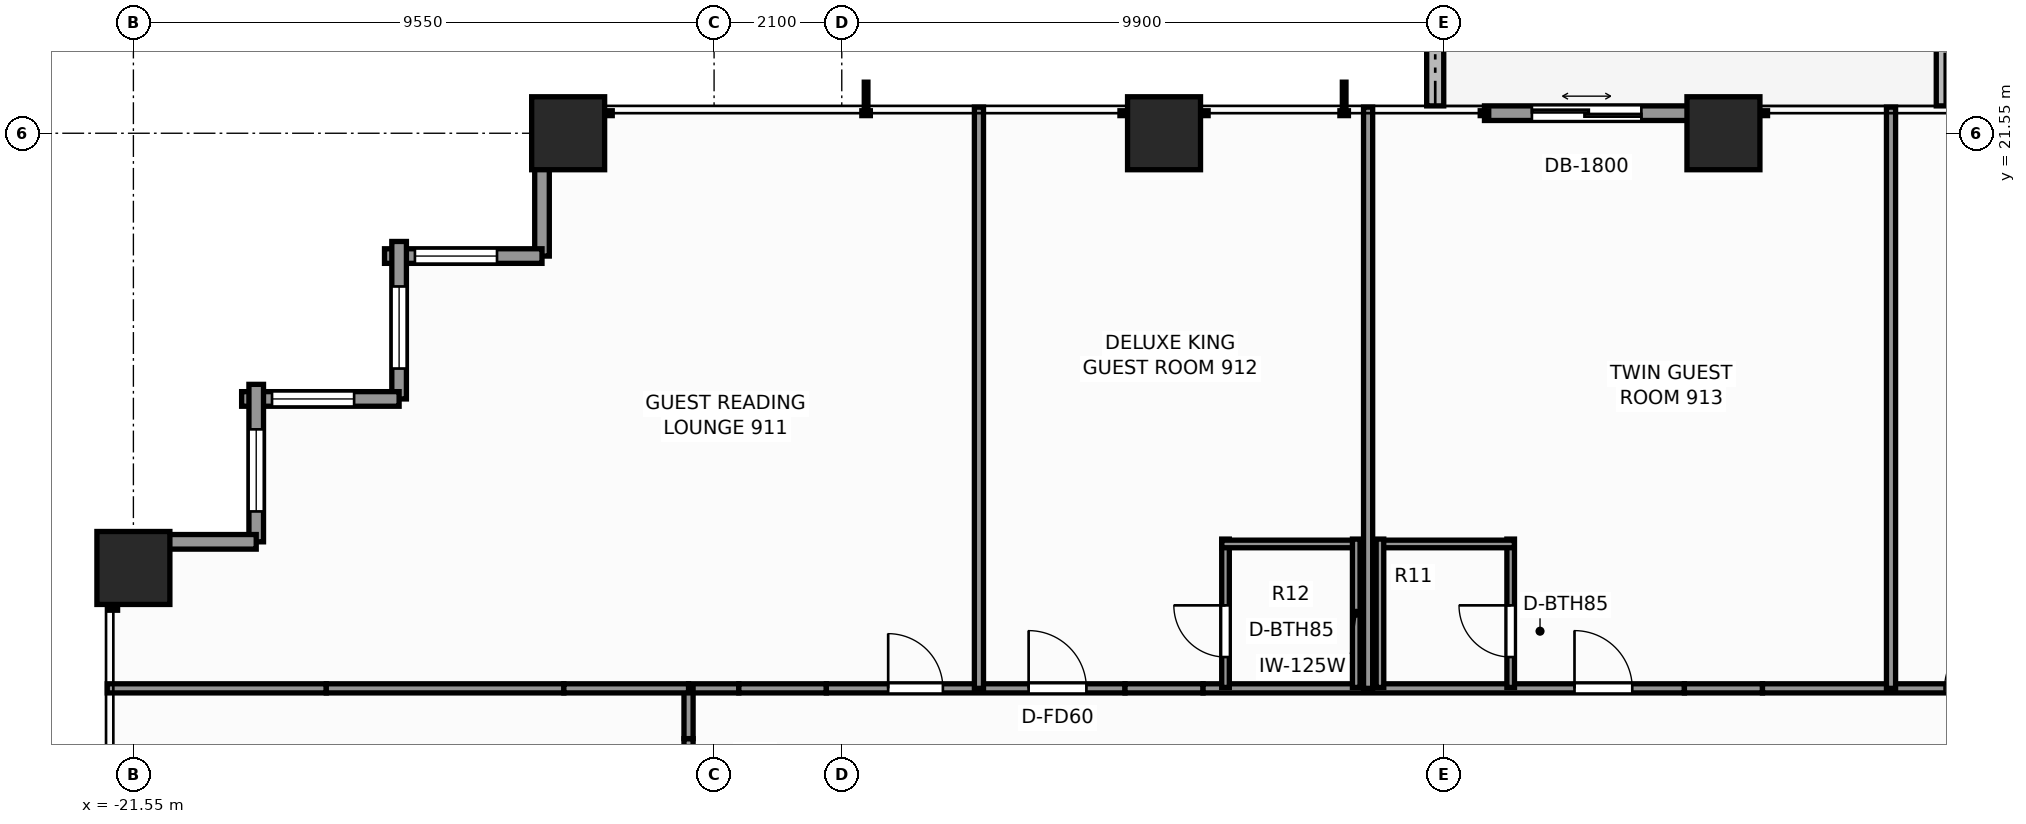
"""IFC4 building model, lengths in metres.
Left out: names, types, materials, properties, quantities, classifications, styles, units other than length and angle.
Written with IfcOpenShell. Run it as: python <this file> out.ifc"""

import sys

from ifc_helpers import new_model, si_unit, direction, frame, frame_2d, origin, origin_2d, place, context, subcontext, project, spatial, rectangle, extrude, element, fill, save


model = new_model("IFC4")
c1 = context("Model", 3, precision=1e-05, world=origin(), true_north=direction((0.0, 1.0)))
c2 = subcontext(c1, "Body", "Model", "MODEL_VIEW")
j1 = project(units=[si_unit("LENGTHUNIT", "METRE"), si_unit("PLANEANGLEUNIT", "RADIAN")], contexts=[c1])
p1 = place(None, origin())
s1 = spatial("IfcSite", under=j1, at=p1, CompositionType="ELEMENT")
p2 = place(p1, origin())
s2 = spatial("IfcBuilding", under=s1, at=p2, CompositionType="ELEMENT")
p3 = place(p2, frame((0.0, 0.0, 33.7)))
s3 = spatial("IfcBuildingStorey", under=s2, at=p3, CompositionType="ELEMENT", Elevation=33.7)
for number, where, z_axis, x_axis in (
    (1, (-14.4, 21.55, 0.0), (0.0, 0.0, 1.0), (1.0, 0.0, 0.0)),
    (2, (-4.6, 21.55, 0.0), (0.0, 0.0, 1.0), (1.0, 0.0, 0.0)),
    (3, (4.6, 21.55, 0.0), (0.0, 0.0, 1.0), (1.0, 0.0, 0.0)),
    (4, (-21.55, 14.4, 0.0), (0.0, 0.0, 1.0), (1.0, 0.0, 0.0)),
):
    element("IfcColumn", number, at=place(p3, frame(where, z_axis=z_axis, x_axis=x_axis)), inside=s3, PredefinedType="COLUMN", context=c2, shape_type="SweptSolid", body=[
        extrude(rectangle(XDim=1.2, YDim=1.2, at=origin_2d()), origin(), (0.0, 0.0, 1.0), 3.3),
    ])
for number, where, z_axis, x_axis in (
    (5, (8.24, 22.0, -0.06), (0.0, 0.0, 1.0), (0.0, 1.0, 0.0)),
    (6, (-0.14, 25.3, -0.06), (0.0, 0.0, 1.0), (0.0, -1.0, 0.0)),
):
    element("IfcWall", number, at=place(p3, frame(where, z_axis=z_axis, x_axis=x_axis)), inside=s3, PredefinedType="PARAPET", context=c2, shape_type="SweptSolid", body=[
        extrude(rectangle(XDim=3.3, YDim=0.28, at=frame_2d((1.65, 0.0))), origin(), (0.0, 0.0, 1.0), 0.42),
    ])
p4 = place(p3, frame((0.67, 21.88, 0.0), z_axis=(0.0, 0.0, 1.0), x_axis=(1.0, 0.0, 0.0)))
e7 = element("IfcWall", 7, at=p4, inside=s3, PredefinedType="STANDARD", context=c2, shape_type="SweptSolid", body=[
    extrude(rectangle(XDim=3.36, YDim=0.24, at=frame_2d((1.68, 0.0))), origin(), (0.0, 0.0, 1.0), 3.06),
])
p5 = place(p4, frame((0.78, 0.0, 0.0)))
e8 = element("IfcOpeningElement", 8, at=p5, cuts=e7, PredefinedType="OPENING", context=c2, shape_type="SweptSolid", body=[
    extrude(rectangle(XDim=1.8, YDim=2.2, at=frame_2d((0.9, 1.1))), frame((0.0, 0.13, 0.0), z_axis=(0.0, -1.0, 0.0), x_axis=(1.0, 0.0, 0.0)), (0.0, 0.0, 1.0), 0.26),
])
p6 = place(p3, frame((-14.83, 19.53, 0.0), z_axis=(0.0, 0.0, 1.0), x_axis=(0.0, 1.0, 0.0)))
e9 = element("IfcWall", 9, at=p6, inside=s3, PredefinedType="STANDARD", context=c2, shape_type="SweptSolid", body=[
    extrude(rectangle(XDim=2.59, YDim=0.24, at=frame_2d((1.295, 0.0))), origin(), (0.0, 0.0, 1.0), 1.955),
])
p7 = place(p3, frame((-17.42, 19.53, 0.0), z_axis=(0.0, 0.0, 1.0), x_axis=(1.0, 0.0, 0.0)))
e10 = element("IfcWall", 10, at=p7, inside=s3, PredefinedType="STANDARD", context=c2, shape_type="SweptSolid", body=[
    extrude(rectangle(XDim=2.59, YDim=0.24, at=frame_2d((1.295, 0.0))), origin(), (0.0, 0.0, 1.0), 2.439),
])
p8 = place(p7, frame((0.5, 0.0, 0.65)))
e11 = element("IfcOpeningElement", 11, at=p8, cuts=e10, PredefinedType="OPENING", context=c2, shape_type="SweptSolid", body=[
    extrude(rectangle(XDim=1.35, YDim=1.55, at=frame_2d((0.675, 0.775))), frame((0.0, 0.13, 0.0), z_axis=(0.0, -1.0, 0.0), x_axis=(1.0, 0.0, 0.0)), (0.0, 0.0, 1.0), 0.26),
])
p9 = place(p3, frame((-17.18, 17.18, 0.0), z_axis=(0.0, 0.0, 1.0), x_axis=(0.0, 1.0, 0.0)))
e12 = element("IfcWall", 12, at=p9, inside=s3, PredefinedType="STANDARD", context=c2, shape_type="SweptSolid", body=[
    extrude(rectangle(XDim=2.59, YDim=0.24, at=frame_2d((1.295, 0.0))), origin(), (0.0, 0.0, 1.0), 2.439),
])
p10 = place(p9, frame((0.5, 0.0, 0.65)))
e13 = element("IfcOpeningElement", 13, at=p10, cuts=e12, PredefinedType="OPENING", context=c2, shape_type="SweptSolid", body=[
    extrude(rectangle(XDim=1.35, YDim=1.55, at=frame_2d((0.675, 0.775))), frame((0.0, 0.13, 0.0), z_axis=(0.0, -1.0, 0.0), x_axis=(1.0, 0.0, 0.0)), (0.0, 0.0, 1.0), 0.26),
])
p11 = place(p3, frame((-19.77, 17.18, 0.0), z_axis=(0.0, 0.0, 1.0), x_axis=(1.0, 0.0, 0.0)))
e14 = element("IfcWall", 14, at=p11, inside=s3, PredefinedType="STANDARD", context=c2, shape_type="SweptSolid", body=[
    extrude(rectangle(XDim=2.59, YDim=0.24, at=frame_2d((1.295, 0.0))), origin(), (0.0, 0.0, 1.0), 2.439),
])
p12 = place(p11, frame((0.5, 0.0, 0.65)))
e15 = element("IfcOpeningElement", 15, at=p12, cuts=e14, PredefinedType="OPENING", context=c2, shape_type="SweptSolid", body=[
    extrude(rectangle(XDim=1.35, YDim=1.55, at=frame_2d((0.675, 0.775))), frame((0.0, 0.13, 0.0), z_axis=(0.0, -1.0, 0.0), x_axis=(1.0, 0.0, 0.0)), (0.0, 0.0, 1.0), 0.26),
])
p13 = place(p3, frame((-19.53, 14.83, 0.0), z_axis=(0.0, 0.0, 1.0), x_axis=(0.0, 1.0, 0.0)))
e16 = element("IfcWall", 16, at=p13, inside=s3, PredefinedType="STANDARD", context=c2, shape_type="SweptSolid", body=[
    extrude(rectangle(XDim=2.59, YDim=0.24, at=frame_2d((1.295, 0.0))), origin(), (0.0, 0.0, 1.0), 2.439),
])
p14 = place(p13, frame((0.5, 0.0, 0.65)))
e17 = element("IfcOpeningElement", 17, at=p14, cuts=e16, PredefinedType="OPENING", context=c2, shape_type="SweptSolid", body=[
    extrude(rectangle(XDim=1.35, YDim=1.55, at=frame_2d((0.675, 0.775))), frame((0.0, 0.13, 0.0), z_axis=(0.0, -1.0, 0.0), x_axis=(1.0, 0.0, 0.0)), (0.0, 0.0, 1.0), 0.26),
])
p15 = place(p3, frame((-22.12, 14.83, 0.0), z_axis=(0.0, 0.0, 1.0), x_axis=(1.0, 0.0, 0.0)))
e18 = element("IfcWall", 18, at=p15, inside=s3, PredefinedType="STANDARD", context=c2, shape_type="SweptSolid", body=[
    extrude(rectangle(XDim=2.59, YDim=0.24, at=frame_2d((1.295, 0.0))), origin(), (0.0, 0.0, 1.0), 1.955),
])
p16 = place(p3, frame((-12.42, 12.42, 0.0), z_axis=(0.0, 0.0, 1.0), x_axis=(1.0, 0.0, 0.0)))
e19 = element("IfcWall", 19, at=p16, inside=s3, PredefinedType="PARTITIONING", context=c2, shape_type="SweptSolid", body=[
    extrude(rectangle(XDim=0.827, YDim=0.15, at=frame_2d((0.414, 0.0))), origin(), (0.0, 0.0, 1.0), 3.06),
])
p17 = place(p3, frame((-11.593, 12.42, 0.0), z_axis=(0.0, 0.0, 1.0), x_axis=(1.0, 0.0, 0.0)))
e20 = element("IfcWall", 20, at=p17, inside=s3, PredefinedType="PARTITIONING", context=c2, shape_type="SweptSolid", body=[
    extrude(rectangle(XDim=1.439, YDim=0.15, at=frame_2d((0.72, 0.0))), origin(), (0.0, 0.0, 1.0), 1.945),
])
p18 = place(p3, frame((-10.154, 12.42, 0.0), z_axis=(0.0, 0.0, 1.0), x_axis=(1.0, 0.0, 0.0)))
e21 = element("IfcWall", 21, at=p18, inside=s3, PredefinedType="PARTITIONING", context=c2, shape_type="SweptSolid", body=[
    extrude(rectangle(XDim=4.912, YDim=0.15, at=frame_2d((2.456, 0.0))), origin(), (0.0, 0.0, 1.0), 3.06),
])
p19 = place(p18, frame((1.017, 0.0, 0.0)))
e22 = element("IfcOpeningElement", 22, at=p19, cuts=e21, PredefinedType="OPENING", context=c2, shape_type="SweptSolid", body=[
    extrude(rectangle(XDim=0.9, YDim=2.06, at=frame_2d((0.45, 1.03))), frame((0.0, 0.085, 0.0), z_axis=(0.0, -1.0, 0.0), x_axis=(1.0, 0.0, 0.0)), (0.0, 0.0, 1.0), 0.17),
])
p20 = place(p18, frame((3.327, 0.0, 0.0)))
e23 = element("IfcOpeningElement", 23, at=p20, cuts=e21, PredefinedType="OPENING", context=c2, shape_type="SweptSolid", body=[
    extrude(rectangle(XDim=0.95, YDim=2.06, at=frame_2d((0.475, 1.03))), frame((0.0, 0.085, 0.0), z_axis=(0.0, -1.0, 0.0), x_axis=(1.0, 0.0, 0.0)), (0.0, 0.0, 1.0), 0.17),
])
p21 = place(p3, frame((-5.242, 12.42, 0.0), z_axis=(0.0, 0.0, 1.0), x_axis=(1.0, 0.0, 0.0)))
e24 = element("IfcWall", 24, at=p21, inside=s3, PredefinedType="PARTITIONING", context=c2, shape_type="SweptSolid", body=[
    extrude(rectangle(XDim=1.284, YDim=0.15, at=frame_2d((0.642, 0.0))), origin(), (0.0, 0.0, 1.0), 1.945),
])
p22 = place(p3, frame((-3.958, 12.42, 0.0), z_axis=(0.0, 0.0, 1.0), x_axis=(1.0, 0.0, 0.0)))
e25 = element("IfcWall", 25, at=p22, inside=s3, PredefinedType="PARTITIONING", context=c2, shape_type="SweptSolid", body=[
    extrude(rectangle(XDim=7.916, YDim=0.15, at=frame_2d((3.958, 0.0))), origin(), (0.0, 0.0, 1.0), 2.585),
])
p23 = place(p22, frame((6.108, 0.0, 0.0)))
e26 = element("IfcOpeningElement", 26, at=p23, cuts=e25, PredefinedType="OPENING", context=c2, shape_type="SweptSolid", body=[
    extrude(rectangle(XDim=0.95, YDim=2.06, at=frame_2d((0.475, 1.03))), frame((0.0, 0.085, 0.0), z_axis=(0.0, -1.0, 0.0), x_axis=(1.0, 0.0, 0.0)), (0.0, 0.0, 1.0), 0.17),
])
p24 = place(p3, frame((3.958, 12.42, 0.0), z_axis=(0.0, 0.0, 1.0), x_axis=(1.0, 0.0, 0.0)))
e27 = element("IfcWall", 27, at=p24, inside=s3, PredefinedType="PARTITIONING", context=c2, shape_type="SweptSolid", body=[
    extrude(rectangle(XDim=1.284, YDim=0.15, at=frame_2d((0.642, 0.0))), origin(), (0.0, 0.0, 1.0), 1.945),
])
p25 = place(p3, frame((5.242, 12.42, 0.0), z_axis=(0.0, 0.0, 1.0), x_axis=(1.0, 0.0, 0.0)))
e28 = element("IfcWall", 28, at=p25, inside=s3, PredefinedType="PARTITIONING", context=c2, shape_type="SweptSolid", body=[
    extrude(rectangle(XDim=4.912, YDim=0.15, at=frame_2d((2.456, 0.0))), origin(), (0.0, 0.0, 1.0), 3.06),
])
p26 = place(p25, frame((2.995, 0.0, 0.0)))
e29 = element("IfcOpeningElement", 29, at=p26, cuts=e28, PredefinedType="OPENING", context=c2, shape_type="SweptSolid", body=[
    extrude(rectangle(XDim=0.9, YDim=2.06, at=frame_2d((0.45, 1.03))), frame((0.0, 0.085, 0.0), z_axis=(0.0, -1.0, 0.0), x_axis=(1.0, 0.0, 0.0)), (0.0, 0.0, 1.0), 0.17),
])
p27 = place(p3, frame((-12.42, 10.154, 0.0), z_axis=(0.0, 0.0, 1.0), x_axis=(0.0, 1.0, 0.0)))
e30 = element("IfcWall", 30, at=p27, inside=s3, PredefinedType="PARTITIONING", context=c2, shape_type="SweptSolid", body=[
    extrude(rectangle(XDim=1.439, YDim=0.15, at=frame_2d((0.72, 0.0))), origin(), (0.0, 0.0, 1.0), 1.945),
])
p28 = place(p3, frame((-12.42, 11.593, 0.0), z_axis=(0.0, 0.0, 1.0), x_axis=(0.0, 1.0, 0.0)))
e31 = element("IfcWall", 31, at=p28, inside=s3, PredefinedType="PARTITIONING", context=c2, shape_type="SweptSolid", body=[
    extrude(rectangle(XDim=0.827, YDim=0.15, at=frame_2d((0.414, 0.0))), origin(), (0.0, 0.0, 1.0), 3.06),
])
p29 = place(p3, frame((-21.98, 12.42, 0.0), z_axis=(0.0, 0.0, 1.0), x_axis=(1.0, 0.0, 0.0)))
e32 = element("IfcWall", 32, at=p29, inside=s3, PredefinedType="PARTITIONING", context=c2, shape_type="SweptSolid", body=[
    extrude(rectangle(XDim=3.602, YDim=0.15, at=frame_2d((1.801, 0.0))), origin(), (0.0, 0.0, 1.0), 2.429),
])
p30 = place(p3, frame((-18.378, 12.42, 0.0), z_axis=(0.0, 0.0, 1.0), x_axis=(1.0, 0.0, 0.0)))
e33 = element("IfcWall", 33, at=p30, inside=s3, PredefinedType="PARTITIONING", context=c2, shape_type="SweptSolid", body=[
    extrude(rectangle(XDim=3.907, YDim=0.15, at=frame_2d((1.954, 0.0))), origin(), (0.0, 0.0, 1.0), 1.945),
])
p31 = place(p3, frame((-14.47, 12.42, 0.0), z_axis=(0.0, 0.0, 1.0), x_axis=(1.0, 0.0, 0.0)))
e34 = element("IfcWall", 34, at=p31, inside=s3, PredefinedType="PARTITIONING", context=c2, shape_type="SweptSolid", body=[
    extrude(rectangle(XDim=2.05, YDim=0.15, at=frame_2d((1.025, 0.0))), origin(), (0.0, 0.0, 1.0), 3.06),
])
for number, where, z_axis, x_axis in (
    (35, (-7.644, 12.42, 0.0), (0.0, 0.0, 1.0), (0.0, 1.0, 0.0)),
    (36, (-1.244, 12.42, 0.0), (0.0, 0.0, 1.0), (0.0, 1.0, 0.0)),
):
    element("IfcWall", number, at=place(p3, frame(where, z_axis=z_axis, x_axis=x_axis)), inside=s3, PredefinedType="PARTITIONING", context=c2, shape_type="SweptSolid", body=[
        extrude(rectangle(XDim=9.56, YDim=0.15, at=frame_2d((4.78, 0.0))), origin(), (0.0, 0.0, 1.0), 2.429),
    ])
p32 = place(p3, frame((-3.589, 12.435, 0.0), z_axis=(0.0, 0.0, 1.0), x_axis=(0.0, 1.0, 0.0)))
e37 = element("IfcWall", 37, at=p32, inside=s3, PredefinedType="PARTITIONING", context=c2, shape_type="SweptSolid", body=[
    extrude(rectangle(XDim=2.44, YDim=0.125, at=frame_2d((1.22, 0.0))), origin(), (0.0, 0.0, 1.0), 3.06),
])
p33 = place(p32, frame((0.5, 0.0, 0.0)))
e38 = element("IfcOpeningElement", 38, at=p33, cuts=e37, PredefinedType="OPENING", context=c2, shape_type="SweptSolid", body=[
    extrude(rectangle(XDim=0.85, YDim=2.03, at=frame_2d((0.425, 1.015))), frame((0.0, 0.073, 0.0), z_axis=(0.0, -1.0, 0.0), x_axis=(1.0, 0.0, 0.0)), (0.0, 0.0, 1.0), 0.145),
])
p34 = place(p3, frame((-3.649, 14.795, 0.0), z_axis=(0.0, 0.0, 1.0), x_axis=(1.0, 0.0, 0.0)))
e39 = element("IfcWall", 39, at=p34, inside=s3, PredefinedType="PARTITIONING", context=c2, shape_type="SweptSolid", body=[
    extrude(rectangle(XDim=2.27, YDim=0.125, at=frame_2d((1.135, 0.0))), origin(), (0.0, 0.0, 1.0), 3.06),
])
p35 = place(p3, frame((-1.439, 12.435, 0.0), z_axis=(0.0, 0.0, 1.0), x_axis=(0.0, 1.0, 0.0)))
e40 = element("IfcWall", 40, at=p35, inside=s3, PredefinedType="PARTITIONING", context=c2, shape_type="SweptSolid", body=[
    extrude(rectangle(XDim=2.44, YDim=0.125, at=frame_2d((1.22, 0.0))), origin(), (0.0, 0.0, 1.0), 3.06),
])
p36 = place(p3, frame((7.356, 12.42, 0.0), z_axis=(0.0, 0.0, 1.0), x_axis=(0.0, 1.0, 0.0)))
e41 = element("IfcWall", 41, at=p36, inside=s3, PredefinedType="PARTITIONING", context=c2, shape_type="SweptSolid", body=[
    extrude(rectangle(XDim=9.56, YDim=0.15, at=frame_2d((4.78, 0.0))), origin(), (0.0, 0.0, 1.0), 2.429),
])
p37 = place(p3, frame((1.101, 12.435, 0.0), z_axis=(0.0, 0.0, 1.0), x_axis=(0.0, 1.0, 0.0)))
e42 = element("IfcWall", 42, at=p37, inside=s3, PredefinedType="PARTITIONING", context=c2, shape_type="SweptSolid", body=[
    extrude(rectangle(XDim=2.44, YDim=0.125, at=frame_2d((1.22, 0.0))), origin(), (0.0, 0.0, 1.0), 3.06),
])
p38 = place(p37, frame((0.5, 0.0, 0.0)))
e43 = element("IfcOpeningElement", 43, at=p38, cuts=e42, PredefinedType="OPENING", context=c2, shape_type="SweptSolid", body=[
    extrude(rectangle(XDim=0.85, YDim=2.03, at=frame_2d((0.425, 1.015))), frame((0.0, 0.073, 0.0), z_axis=(0.0, -1.0, 0.0), x_axis=(1.0, 0.0, 0.0)), (0.0, 0.0, 1.0), 0.145),
])
p39 = place(p3, frame((-1.109, 14.795, 0.0), z_axis=(0.0, 0.0, 1.0), x_axis=(1.0, 0.0, 0.0)))
e44 = element("IfcWall", 44, at=p39, inside=s3, PredefinedType="PARTITIONING", context=c2, shape_type="SweptSolid", body=[
    extrude(rectangle(XDim=2.27, YDim=0.125, at=frame_2d((1.135, 0.0))), origin(), (0.0, 0.0, 1.0), 2.585),
])
p40 = place(p3, frame((-1.049, 12.435, 0.0), z_axis=(0.0, 0.0, 1.0), x_axis=(0.0, 1.0, 0.0)))
e45 = element("IfcWall", 45, at=p40, inside=s3, PredefinedType="PARTITIONING", context=c2, shape_type="SweptSolid", body=[
    extrude(rectangle(XDim=2.44, YDim=0.125, at=frame_2d((1.22, 0.0))), origin(), (0.0, 0.0, 1.0), 3.06),
])
p41 = place(p5, origin())
e46 = element("IfcDoor", 46, at=p41, inside=s3, OperationType="DOUBLE_DOOR_SLIDING", PredefinedType="DOOR", context=c2, shape_type="SweptSolid", body=[
    extrude(rectangle(XDim=1.8, YDim=2.2, at=frame_2d((0.9, 1.1))), frame((0.0, 0.025, 0.0), z_axis=(0.0, -1.0, 0.0), x_axis=(1.0, 0.0, 0.0)), (0.0, 0.0, 1.0), 0.05),
])
fill(e8, e46)
p42 = place(p8, origin())
e47 = element("IfcWindow", 47, at=p42, inside=s3, PartitioningType="SINGLE_PANEL", PredefinedType="WINDOW", context=c2, shape_type="SweptSolid", body=[
    extrude(rectangle(XDim=1.35, YDim=1.55, at=frame_2d((0.675, 0.775))), frame((0.0, 0.03, 0.0), z_axis=(0.0, -1.0, 0.0), x_axis=(1.0, 0.0, 0.0)), (0.0, 0.0, 1.0), 0.06),
])
fill(e11, e47)
p43 = place(p10, origin())
e48 = element("IfcWindow", 48, at=p43, inside=s3, PartitioningType="SINGLE_PANEL", PredefinedType="WINDOW", context=c2, shape_type="SweptSolid", body=[
    extrude(rectangle(XDim=1.35, YDim=1.55, at=frame_2d((0.675, 0.775))), frame((0.0, 0.03, 0.0), z_axis=(0.0, -1.0, 0.0), x_axis=(1.0, 0.0, 0.0)), (0.0, 0.0, 1.0), 0.06),
])
fill(e13, e48)
p44 = place(p12, origin())
e49 = element("IfcWindow", 49, at=p44, inside=s3, PartitioningType="SINGLE_PANEL", PredefinedType="WINDOW", context=c2, shape_type="SweptSolid", body=[
    extrude(rectangle(XDim=1.35, YDim=1.55, at=frame_2d((0.675, 0.775))), frame((0.0, 0.03, 0.0), z_axis=(0.0, -1.0, 0.0), x_axis=(1.0, 0.0, 0.0)), (0.0, 0.0, 1.0), 0.06),
])
fill(e15, e49)
p45 = place(p14, origin())
e50 = element("IfcWindow", 50, at=p45, inside=s3, PartitioningType="SINGLE_PANEL", PredefinedType="WINDOW", context=c2, shape_type="SweptSolid", body=[
    extrude(rectangle(XDim=1.35, YDim=1.55, at=frame_2d((0.675, 0.775))), frame((0.0, 0.03, 0.0), z_axis=(0.0, -1.0, 0.0), x_axis=(1.0, 0.0, 0.0)), (0.0, 0.0, 1.0), 0.06),
])
fill(e17, e50)
p46 = place(p19, origin())
e51 = element("IfcDoor", 51, at=p46, inside=s3, OperationType="SINGLE_SWING_LEFT", PredefinedType="DOOR", context=c2, shape_type="SweptSolid", body=[
    extrude(rectangle(XDim=0.9, YDim=2.06, at=frame_2d((0.45, 1.03))), frame((0.0, 0.025, 0.0), z_axis=(0.0, -1.0, 0.0), x_axis=(1.0, 0.0, 0.0)), (0.0, 0.0, 1.0), 0.05),
])
fill(e22, e51)
p47 = place(p33, origin())
e52 = element("IfcDoor", 52, at=p47, inside=s3, OperationType="SINGLE_SWING_RIGHT", PredefinedType="DOOR", context=c2, shape_type="SweptSolid", body=[
    extrude(rectangle(XDim=0.85, YDim=2.03, at=frame_2d((0.425, 1.015))), frame((0.0, 0.025, 0.0), z_axis=(0.0, -1.0, 0.0), x_axis=(1.0, 0.0, 0.0)), (0.0, 0.0, 1.0), 0.05),
])
fill(e38, e52)
p48 = place(p20, origin())
e53 = element("IfcDoor", 53, at=p48, inside=s3, OperationType="SINGLE_SWING_LEFT", PredefinedType="DOOR", context=c2, shape_type="SweptSolid", body=[
    extrude(rectangle(XDim=0.95, YDim=2.06, at=frame_2d((0.475, 1.03))), frame((0.0, 0.025, 0.0), z_axis=(0.0, -1.0, 0.0), x_axis=(1.0, 0.0, 0.0)), (0.0, 0.0, 1.0), 0.05),
])
fill(e23, e53)
p49 = place(p38, origin())
e54 = element("IfcDoor", 54, at=p49, inside=s3, OperationType="SINGLE_SWING_RIGHT", PredefinedType="DOOR", context=c2, shape_type="SweptSolid", body=[
    extrude(rectangle(XDim=0.85, YDim=2.03, at=frame_2d((0.425, 1.015))), frame((0.0, 0.025, 0.0), z_axis=(0.0, -1.0, 0.0), x_axis=(1.0, 0.0, 0.0)), (0.0, 0.0, 1.0), 0.05),
])
fill(e43, e54)
p50 = place(p23, origin())
e55 = element("IfcDoor", 55, at=p50, inside=s3, OperationType="SINGLE_SWING_LEFT", PredefinedType="DOOR", context=c2, shape_type="SweptSolid", body=[
    extrude(rectangle(XDim=0.95, YDim=2.06, at=frame_2d((0.475, 1.03))), frame((0.0, 0.025, 0.0), z_axis=(0.0, -1.0, 0.0), x_axis=(1.0, 0.0, 0.0)), (0.0, 0.0, 1.0), 0.05),
])
fill(e26, e55)
p51 = place(p26, origin())
e56 = element("IfcDoor", 56, at=p51, inside=s3, OperationType="SINGLE_SWING_RIGHT", PredefinedType="DOOR", context=c2, shape_type="SweptSolid", body=[
    extrude(rectangle(XDim=0.9, YDim=2.06, at=frame_2d((0.45, 1.03))), frame((0.0, 0.025, 0.0), z_axis=(0.0, -1.0, 0.0), x_axis=(1.0, 0.0, 0.0)), (0.0, 0.0, 1.0), 0.05),
])
fill(e29, e56)
save(model, sys.argv[1])
